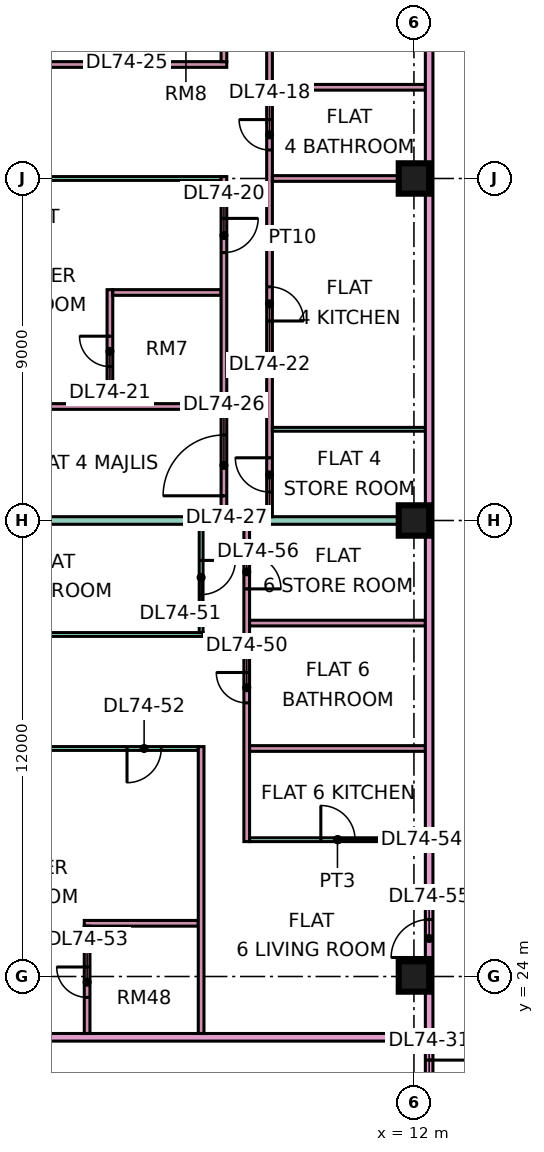
"""IFC4 building model, lengths in metres.
Left out: names, types, materials, properties, quantities, classifications, styles, units other than length and angle.
Written with IfcOpenShell. Run it as: python <this file> out.ifc"""

import sys

from ifc_helpers import new_model, si_unit, direction, frame, frame_2d, origin, origin_2d, place, context, subcontext, project, spatial, rectangle, extrude, element, fill, save


model = new_model("IFC4")
c1 = context("Model", 3, precision=1e-05, world=origin(), true_north=direction((0.0, 1.0)))
c2 = subcontext(c1, "Body", "Model", "MODEL_VIEW")
j1 = project(units=[si_unit("LENGTHUNIT", "METRE"), si_unit("PLANEANGLEUNIT", "RADIAN")], contexts=[c1])
p1 = place(None, origin())
s1 = spatial("IfcSite", under=j1, at=p1, CompositionType="ELEMENT")
p2 = place(p1, origin())
s2 = spatial("IfcBuilding", under=s1, at=p2, CompositionType="ELEMENT")
p3 = place(p2, frame((0.0, 0.0, 314.65)))
s3 = spatial("IfcBuildingStorey", under=s2, at=p3, CompositionType="ELEMENT", Elevation=314.65)
for number, where, z_axis, x_axis in (
    (1, (12.0, 24.0, 0.0), (0.0, 0.0, 1.0), (1.0, 0.0, 0.0)),
    (2, (12.0, 36.0, 0.0), (0.0, 0.0, 1.0), (1.0, 0.0, 0.0)),
    (3, (12.0, 45.0, 0.0), (0.0, 0.0, 1.0), (1.0, 0.0, 0.0)),
):
    element("IfcColumn", number, at=place(p3, frame(where, z_axis=z_axis, x_axis=x_axis)), inside=s3, PredefinedType="COLUMN", context=c2, shape_type="SweptSolid", body=[
        extrude(rectangle(XDim=0.8, YDim=0.8, at=origin_2d()), origin(), (0.0, 0.0, 1.0), 3.75),
    ])
p4 = place(p3, frame((-1.35, 30.0, 0.0), z_axis=(0.0, 0.0, 1.0), x_axis=(1.0, 0.0, 0.0)))
e4 = element("IfcWall", 4, at=p4, inside=s3, PredefinedType="PARTITIONING", context=c2, shape_type="SweptSolid", body=[
    extrude(rectangle(XDim=7.675, YDim=0.1, at=frame_2d((3.837, 0.0))), origin(), (0.0, 0.0, 1.0), 3.35),
])
p5 = place(p4, frame((5.8, 0.0, 0.0)))
e5 = element("IfcOpeningElement", 5, at=p5, cuts=e4, PredefinedType="OPENING", context=c2, shape_type="SweptSolid", body=[
    extrude(rectangle(XDim=0.9, YDim=2.1, at=frame_2d((0.45, 1.05))), frame((0.0, 0.06, 0.0), z_axis=(0.0, -1.0, 0.0), x_axis=(1.0, 0.0, 0.0)), (0.0, 0.0, 1.0), 0.12),
])
p6 = place(p3, frame((-1.35, 33.0, 0.0), z_axis=(0.0, 0.0, 1.0), x_axis=(1.0, 0.0, 0.0)))
e6 = element("IfcWall", 6, at=p6, inside=s3, PredefinedType="PARTITIONING", context=c2, shape_type="SweptSolid", body=[
    extrude(rectangle(XDim=7.8, YDim=0.1, at=frame_2d((3.9, 0.0))), origin(), (0.0, 0.0, 1.0), 3.35),
])
p7 = place(p3, frame((0.0, 36.0, 0.0), z_axis=(0.0, 0.0, 1.0), x_axis=(1.0, 0.0, 0.0)))
e7 = element("IfcWall", 7, at=p7, inside=s3, PredefinedType="PARTITIONING", context=c2, shape_type="SweptSolid", body=[
    extrude(rectangle(XDim=12.3, YDim=0.2, at=frame_2d((6.15, 0.0))), origin(), (0.0, 0.0, 1.0), 3.35),
])
p8 = place(p3, frame((0.0, 48.0, 0.0), z_axis=(0.0, 0.0, 1.0), x_axis=(1.0, 0.0, 0.0)))
e8 = element("IfcWall", 8, at=p8, inside=s3, PredefinedType="PARTITIONING", context=c2, shape_type="SweptSolid", body=[
    extrude(rectangle(XDim=7.075, YDim=0.15, at=frame_2d((3.538, 0.0))), origin(), (0.0, 0.0, 1.0), 3.35),
])
p9 = place(p3, frame((0.074, 22.4, 0.0), z_axis=(0.0, 0.0, 1.0), x_axis=(1.0, 0.0, 0.0)))
e9 = element("IfcWall", 9, at=p9, inside=s3, PredefinedType="PARTITIONING", context=c2, shape_type="SweptSolid", body=[
    extrude(rectangle(XDim=12.226, YDim=0.2, at=frame_2d((6.113, 0.0))), origin(), (0.0, 0.0, 1.0), 3.35),
])
p10 = place(p3, frame((0.074, 39.0, 0.0), z_axis=(0.0, 0.0, 1.0), x_axis=(1.0, 0.0, 0.0)))
e10 = element("IfcWall", 10, at=p10, inside=s3, PredefinedType="PARTITIONING", context=c2, shape_type="SweptSolid", body=[
    extrude(rectangle(XDim=6.851, YDim=0.15, at=frame_2d((3.426, 0.0))), origin(), (0.0, 0.0, 1.0), 3.35),
])
p11 = place(p3, frame((0.074, 45.0, 0.0), z_axis=(0.0, 0.0, 1.0), x_axis=(1.0, 0.0, 0.0)))
e11 = element("IfcWall", 11, at=p11, inside=s3, PredefinedType="PARTITIONING", context=c2, shape_type="SweptSolid", body=[
    extrude(rectangle(XDim=6.851, YDim=0.1, at=frame_2d((3.426, 0.0))), origin(), (0.0, 0.0, 1.0), 3.35),
])
p12 = place(p3, frame((3.325, 25.4, 0.0), z_axis=(0.0, 0.0, 1.0), x_axis=(1.0, 0.0, 0.0)))
e12 = element("IfcWall", 12, at=p12, inside=s3, PredefinedType="PARTITIONING", context=c2, shape_type="SweptSolid", body=[
    extrude(rectangle(XDim=3.0, YDim=0.15, at=frame_2d((1.5, 0.0))), origin(), (0.0, 0.0, 1.0), 3.35),
])
p13 = place(p3, frame((3.4, 22.5, 0.0), z_axis=(0.0, 0.0, 1.0), x_axis=(0.0, 1.0, 0.0)))
e13 = element("IfcWall", 13, at=p13, inside=s3, PredefinedType="PARTITIONING", context=c2, shape_type="SweptSolid", body=[
    extrude(rectangle(XDim=2.825, YDim=0.15, at=frame_2d((1.413, 0.0))), origin(), (0.0, 0.0, 1.0), 3.35),
])
p14 = place(p13, frame((0.95, 0.0, 0.0)))
e14 = element("IfcOpeningElement", 14, at=p14, cuts=e13, PredefinedType="OPENING", context=c2, shape_type="SweptSolid", body=[
    extrude(rectangle(XDim=0.8, YDim=2.1, at=frame_2d((0.4, 1.05))), frame((0.0, 0.085, 0.0), z_axis=(0.0, -1.0, 0.0), x_axis=(1.0, 0.0, 0.0)), (0.0, 0.0, 1.0), 0.17),
])
p15 = place(p3, frame((4.0, 39.075, 0.0), z_axis=(0.0, 0.0, 1.0), x_axis=(0.0, 1.0, 0.0)))
e15 = element("IfcWall", 15, at=p15, inside=s3, PredefinedType="PARTITIONING", context=c2, shape_type="SweptSolid", body=[
    extrude(rectangle(XDim=3.0, YDim=0.15, at=frame_2d((1.5, 0.0))), origin(), (0.0, 0.0, 1.0), 3.35),
])
p16 = place(p15, frame((0.975, 0.0, 0.0)))
e16 = element("IfcOpeningElement", 16, at=p16, cuts=e15, PredefinedType="OPENING", context=c2, shape_type="SweptSolid", body=[
    extrude(rectangle(XDim=0.8, YDim=2.1, at=frame_2d((0.4, 1.05))), frame((0.0, 0.085, 0.0), z_axis=(0.0, -1.0, 0.0), x_axis=(1.0, 0.0, 0.0)), (0.0, 0.0, 1.0), 0.17),
])
p17 = place(p3, frame((4.075, 42.0, 0.0), z_axis=(0.0, 0.0, 1.0), x_axis=(1.0, 0.0, 0.0)))
e17 = element("IfcWall", 17, at=p17, inside=s3, PredefinedType="PARTITIONING", context=c2, shape_type="SweptSolid", body=[
    extrude(rectangle(XDim=2.85, YDim=0.15, at=frame_2d((1.425, 0.0))), origin(), (0.0, 0.0, 1.0), 3.35),
])
p18 = place(p3, frame((5.0, 48.075, 0.0), z_axis=(0.0, 0.0, 1.0), x_axis=(0.0, 1.0, 0.0)))
e18 = element("IfcWall", 18, at=p18, inside=s3, PredefinedType="PARTITIONING", context=c2, shape_type="SweptSolid", body=[
    extrude(rectangle(XDim=1.45, YDim=0.15, at=frame_2d((0.725, 0.0))), origin(), (0.0, 0.0, 1.0), 3.35),
])
p19 = place(p3, frame((6.4, 22.5, 0.0), z_axis=(0.0, 0.0, 1.0), x_axis=(0.0, 1.0, 0.0)))
e19 = element("IfcWall", 19, at=p19, inside=s3, PredefinedType="PARTITIONING", context=c2, shape_type="SweptSolid", body=[
    extrude(rectangle(XDim=7.55, YDim=0.15, at=frame_2d((3.775, 0.0))), origin(), (0.0, 0.0, 1.0), 3.35),
])
p20 = place(p3, frame((6.4, 33.05, 0.0), z_axis=(0.0, 0.0, 1.0), x_axis=(0.0, 1.0, 0.0)))
e20 = element("IfcWall", 20, at=p20, inside=s3, PredefinedType="PARTITIONING", context=c2, shape_type="SweptSolid", body=[
    extrude(rectangle(XDim=2.85, YDim=0.1, at=frame_2d((1.425, 0.0))), origin(), (0.0, 0.0, 1.0), 3.35),
])
p21 = place(p20, frame((1.0, 0.0, 0.0)))
e21 = element("IfcOpeningElement", 21, at=p21, cuts=e20, PredefinedType="OPENING", context=c2, shape_type="SweptSolid", body=[
    extrude(rectangle(XDim=0.9, YDim=2.1, at=frame_2d((0.45, 1.05))), frame((0.0, 0.06, 0.0), z_axis=(0.0, -1.0, 0.0), x_axis=(1.0, 0.0, 0.0)), (0.0, 0.0, 1.0), 0.12),
])
p22 = place(p3, frame((7.0, 36.1, 0.0), z_axis=(0.0, 0.0, 1.0), x_axis=(0.0, 1.0, 0.0)))
e22 = element("IfcWall", 22, at=p22, inside=s3, PredefinedType="PARTITIONING", context=c2, shape_type="SweptSolid", body=[
    extrude(rectangle(XDim=8.95, YDim=0.15, at=frame_2d((4.475, 0.0))), origin(), (0.0, 0.0, 1.0), 3.35),
])
p23 = place(p22, frame((6.95, 0.0, 0.0)))
e23 = element("IfcOpeningElement", 23, at=p23, cuts=e22, PredefinedType="OPENING", context=c2, shape_type="SweptSolid", body=[
    extrude(rectangle(XDim=0.9, YDim=2.1, at=frame_2d((0.45, 1.05))), frame((0.0, 0.085, 0.0), z_axis=(0.0, -1.0, 0.0), x_axis=(1.0, 0.0, 0.0)), (0.0, 0.0, 1.0), 0.17),
])
p24 = place(p22, frame((0.55, 0.0, 0.0)))
e24 = element("IfcOpeningElement", 24, at=p24, cuts=e22, PredefinedType="OPENING", context=c2, shape_type="SweptSolid", body=[
    extrude(rectangle(XDim=1.6, YDim=2.1, at=frame_2d((0.8, 1.05))), frame((0.0, 0.085, 0.0), z_axis=(0.0, -1.0, 0.0), x_axis=(1.0, 0.0, 0.0)), (0.0, 0.0, 1.0), 0.17),
])
p25 = place(p3, frame((7.0, 48.075, 0.0), z_axis=(0.0, 0.0, 1.0), x_axis=(0.0, 1.0, 0.0)))
e25 = element("IfcWall", 25, at=p25, inside=s3, PredefinedType="PARTITIONING", context=c2, shape_type="SweptSolid", body=[
    extrude(rectangle(XDim=7.275, YDim=0.15, at=frame_2d((3.638, 0.0))), origin(), (0.0, 0.0, 1.0), 3.35),
])
p26 = place(p25, frame((3.975, 0.0, 0.0)))
e26 = element("IfcOpeningElement", 26, at=p26, cuts=e25, PredefinedType="OPENING", context=c2, shape_type="SweptSolid", body=[
    extrude(rectangle(XDim=0.9, YDim=2.1, at=frame_2d((0.45, 1.05))), frame((0.0, 0.085, 0.0), z_axis=(0.0, -1.0, 0.0), x_axis=(1.0, 0.0, 0.0)), (0.0, 0.0, 1.0), 0.17),
])
p27 = place(p25, frame((1.825, 0.0, 0.0)))
e27 = element("IfcOpeningElement", 27, at=p27, cuts=e25, PredefinedType="OPENING", context=c2, shape_type="SweptSolid", body=[
    extrude(rectangle(XDim=0.8, YDim=2.1, at=frame_2d((0.4, 1.05))), frame((0.0, 0.085, 0.0), z_axis=(0.0, -1.0, 0.0), x_axis=(1.0, 0.0, 0.0)), (0.0, 0.0, 1.0), 0.17),
])
p28 = place(p3, frame((7.6, 27.55, 0.0), z_axis=(0.0, 0.0, 1.0), x_axis=(0.0, 1.0, 0.0)))
e28 = element("IfcWall", 28, at=p28, inside=s3, PredefinedType="PARTITIONING", context=c2, shape_type="SweptSolid", body=[
    extrude(rectangle(XDim=8.35, YDim=0.15, at=frame_2d((4.175, 0.0))), origin(), (0.0, 0.0, 1.0), 3.35),
])
p29 = place(p28, frame((3.65, 0.0, 0.0)))
e29 = element("IfcOpeningElement", 29, at=p29, cuts=e28, PredefinedType="OPENING", context=c2, shape_type="SweptSolid", body=[
    extrude(rectangle(XDim=0.8, YDim=2.1, at=frame_2d((0.4, 1.05))), frame((0.0, 0.085, 0.0), z_axis=(0.0, -1.0, 0.0), x_axis=(1.0, 0.0, 0.0)), (0.0, 0.0, 1.0), 0.17),
])
p30 = place(p28, frame((6.65, 0.0, 0.0)))
e30 = element("IfcOpeningElement", 30, at=p30, cuts=e28, PredefinedType="OPENING", context=c2, shape_type="SweptSolid", body=[
    extrude(rectangle(XDim=0.9, YDim=2.1, at=frame_2d((0.45, 1.05))), frame((0.0, 0.085, 0.0), z_axis=(0.0, -1.0, 0.0), x_axis=(1.0, 0.0, 0.0)), (0.0, 0.0, 1.0), 0.17),
])
p31 = place(p3, frame((7.675, 27.6, 0.0), z_axis=(0.0, 0.0, 1.0), x_axis=(1.0, 0.0, 0.0)))
e31 = element("IfcWall", 31, at=p31, inside=s3, PredefinedType="PARTITIONING", context=c2, shape_type="SweptSolid", body=[
    extrude(rectangle(XDim=4.625, YDim=0.1, at=frame_2d((2.312, 0.0))), origin(), (0.0, 0.0, 1.0), 3.35),
])
p32 = place(p31, frame((1.875, 0.0, 0.0)))
e32 = element("IfcOpeningElement", 32, at=p32, cuts=e31, PredefinedType="OPENING", context=c2, shape_type="SweptSolid", body=[
    extrude(rectangle(XDim=0.9, YDim=2.1, at=frame_2d((0.45, 1.05))), frame((0.0, 0.06, 0.0), z_axis=(0.0, -1.0, 0.0), x_axis=(1.0, 0.0, 0.0)), (0.0, 0.0, 1.0), 0.12),
])
for number, where, z_axis, x_axis in (
    (33, (7.675, 30.0, 0.0), (0.0, 0.0, 1.0), (1.0, 0.0, 0.0)),
    (34, (7.675, 33.3, 0.0), (0.0, 0.0, 1.0), (1.0, 0.0, 0.0)),
):
    element("IfcWall", number, at=place(p3, frame(where, z_axis=z_axis, x_axis=x_axis)), inside=s3, PredefinedType="PARTITIONING", context=c2, shape_type="SweptSolid", body=[
        extrude(rectangle(XDim=4.625, YDim=0.15, at=frame_2d((2.312, 0.0))), origin(), (0.0, 0.0, 1.0), 3.35),
    ])
p33 = place(p3, frame((8.2, 36.1, 0.0), z_axis=(0.0, 0.0, 1.0), x_axis=(0.0, 1.0, 0.0)))
e35 = element("IfcWall", 35, at=p33, inside=s3, PredefinedType="PARTITIONING", context=c2, shape_type="SweptSolid", body=[
    extrude(rectangle(XDim=14.65, YDim=0.15, at=frame_2d((7.325, 0.0))), origin(), (0.0, 0.0, 1.0), 3.35),
])
p34 = place(p33, frame((9.65, 0.0, 0.0)))
e36 = element("IfcOpeningElement", 36, at=p34, cuts=e35, PredefinedType="OPENING", context=c2, shape_type="SweptSolid", body=[
    extrude(rectangle(XDim=0.8, YDim=2.1, at=frame_2d((0.4, 1.05))), frame((0.0, 0.085, 0.0), z_axis=(0.0, -1.0, 0.0), x_axis=(1.0, 0.0, 0.0)), (0.0, 0.0, 1.0), 0.17),
])
p35 = place(p33, frame((5.15, 0.0, 0.0)))
e37 = element("IfcOpeningElement", 37, at=p35, cuts=e35, PredefinedType="OPENING", context=c2, shape_type="SweptSolid", body=[
    extrude(rectangle(XDim=0.9, YDim=2.1, at=frame_2d((0.45, 1.05))), frame((0.0, 0.085, 0.0), z_axis=(0.0, -1.0, 0.0), x_axis=(1.0, 0.0, 0.0)), (0.0, 0.0, 1.0), 0.17),
])
p36 = place(p33, frame((0.65, 0.0, 0.0)))
e38 = element("IfcOpeningElement", 38, at=p36, cuts=e35, PredefinedType="OPENING", context=c2, shape_type="SweptSolid", body=[
    extrude(rectangle(XDim=0.9, YDim=2.1, at=frame_2d((0.45, 1.05))), frame((0.0, 0.085, 0.0), z_axis=(0.0, -1.0, 0.0), x_axis=(1.0, 0.0, 0.0)), (0.0, 0.0, 1.0), 0.17),
])
p37 = place(p3, frame((8.275, 38.4, 0.0), z_axis=(0.0, 0.0, 1.0), x_axis=(1.0, 0.0, 0.0)))
e39 = element("IfcWall", 39, at=p37, inside=s3, PredefinedType="PARTITIONING", context=c2, shape_type="SweptSolid", body=[
    extrude(rectangle(XDim=4.025, YDim=0.1, at=frame_2d((2.013, 0.0))), origin(), (0.0, 0.0, 1.0), 3.35),
])
for number, where, z_axis, x_axis in (
    (40, (8.275, 45.0, 0.0), (0.0, 0.0, 1.0), (1.0, 0.0, 0.0)),
    (41, (8.275, 47.4, 0.0), (0.0, 0.0, 1.0), (1.0, 0.0, 0.0)),
):
    element("IfcWall", number, at=place(p3, frame(where, z_axis=z_axis, x_axis=x_axis)), inside=s3, PredefinedType="PARTITIONING", context=c2, shape_type="SweptSolid", body=[
        extrude(rectangle(XDim=4.025, YDim=0.15, at=frame_2d((2.013, 0.0))), origin(), (0.0, 0.0, 1.0), 3.35),
    ])
p38 = place(p3, frame((12.4, 20.0, 0.0), z_axis=(0.0, 0.0, 1.0), x_axis=(0.0, 1.0, 0.0)))
e42 = element("IfcWall", 42, at=p38, inside=s3, PredefinedType="PARTITIONING", context=c2, shape_type="SweptSolid", body=[
    extrude(rectangle(XDim=33.926, YDim=0.2, at=frame_2d((16.963, 0.0))), origin(), (0.0, 0.0, 1.0), 3.35),
])
p39 = place(p38, frame((31.8, 0.0, 0.0)))
e43 = element("IfcOpeningElement", 43, at=p39, cuts=e42, PredefinedType="OPENING", context=c2, shape_type="SweptSolid", body=[
    extrude(rectangle(XDim=1.0, YDim=2.1, at=frame_2d((0.5, 1.05))), frame((0.0, 0.11, 0.0), z_axis=(0.0, -1.0, 0.0), x_axis=(1.0, 0.0, 0.0)), (0.0, 0.0, 1.0), 0.22),
])
p40 = place(p38, frame((0.6, 0.0, 0.0)))
e44 = element("IfcOpeningElement", 44, at=p40, cuts=e42, PredefinedType="OPENING", context=c2, shape_type="SweptSolid", body=[
    extrude(rectangle(XDim=1.2, YDim=2.1, at=frame_2d((0.6, 1.05))), frame((0.0, 0.11, 0.0), z_axis=(0.0, -1.0, 0.0), x_axis=(1.0, 0.0, 0.0)), (0.0, 0.0, 1.0), 0.22),
])
p41 = place(p38, frame((4.5, 0.0, 0.0)))
e45 = element("IfcOpeningElement", 45, at=p41, cuts=e42, PredefinedType="OPENING", context=c2, shape_type="SweptSolid", body=[
    extrude(rectangle(XDim=1.0, YDim=2.1, at=frame_2d((0.5, 1.05))), frame((0.0, 0.11, 0.0), z_axis=(0.0, -1.0, 0.0), x_axis=(1.0, 0.0, 0.0)), (0.0, 0.0, 1.0), 0.22),
])
p42 = place(p34, frame((0.8, 0.0, 0.0), z_axis=(0.0, 0.0, 1.0), x_axis=(-1.0, 0.0, 0.0)))
e46 = element("IfcDoor", 46, at=p42, inside=s3, OperationType="SINGLE_SWING_RIGHT", PredefinedType="DOOR", context=c2, shape_type="SweptSolid", body=[
    extrude(rectangle(XDim=0.8, YDim=2.1, at=frame_2d((0.4, 1.05))), frame((0.0, 0.025, 0.0), z_axis=(0.0, -1.0, 0.0), x_axis=(1.0, 0.0, 0.0)), (0.0, 0.0, 1.0), 0.05),
])
fill(e36, e46)
p43 = place(p23, origin())
e47 = element("IfcDoor", 47, at=p43, inside=s3, OperationType="SINGLE_SWING_RIGHT", PredefinedType="DOOR", context=c2, shape_type="SweptSolid", body=[
    extrude(rectangle(XDim=0.9, YDim=2.1, at=frame_2d((0.45, 1.05))), frame((0.0, 0.025, 0.0), z_axis=(0.0, -1.0, 0.0), x_axis=(1.0, 0.0, 0.0)), (0.0, 0.0, 1.0), 0.05),
])
fill(e23, e47)
p44 = place(p16, frame((0.8, 0.0, 0.0), z_axis=(0.0, 0.0, 1.0), x_axis=(-1.0, 0.0, 0.0)))
e48 = element("IfcDoor", 48, at=p44, inside=s3, OperationType="SINGLE_SWING_RIGHT", PredefinedType="DOOR", context=c2, shape_type="SweptSolid", body=[
    extrude(rectangle(XDim=0.8, YDim=2.1, at=frame_2d((0.4, 1.05))), frame((0.0, 0.025, 0.0), z_axis=(0.0, -1.0, 0.0), x_axis=(1.0, 0.0, 0.0)), (0.0, 0.0, 1.0), 0.05),
])
fill(e16, e48)
p45 = place(p35, frame((0.9, 0.0, 0.0), z_axis=(0.0, 0.0, 1.0), x_axis=(-1.0, 0.0, 0.0)))
e49 = element("IfcDoor", 49, at=p45, inside=s3, OperationType="SINGLE_SWING_LEFT", PredefinedType="DOOR", context=c2, shape_type="SweptSolid", body=[
    extrude(rectangle(XDim=0.9, YDim=2.1, at=frame_2d((0.45, 1.05))), frame((0.0, 0.025, 0.0), z_axis=(0.0, -1.0, 0.0), x_axis=(1.0, 0.0, 0.0)), (0.0, 0.0, 1.0), 0.05),
])
fill(e37, e49)
p46 = place(p24, origin())
e50 = element("IfcDoor", 50, at=p46, inside=s3, OperationType="DOUBLE_DOOR_SINGLE_SWING", PredefinedType="DOOR", context=c2, shape_type="SweptSolid", body=[
    extrude(rectangle(XDim=1.6, YDim=2.1, at=frame_2d((0.8, 1.05))), frame((0.0, 0.025, 0.0), z_axis=(0.0, -1.0, 0.0), x_axis=(1.0, 0.0, 0.0)), (0.0, 0.0, 1.0), 0.05),
])
fill(e24, e50)
p47 = place(p36, frame((0.9, 0.0, 0.0), z_axis=(0.0, 0.0, 1.0), x_axis=(-1.0, 0.0, 0.0)))
e51 = element("IfcDoor", 51, at=p47, inside=s3, OperationType="SINGLE_SWING_RIGHT", PredefinedType="DOOR", context=c2, shape_type="SweptSolid", body=[
    extrude(rectangle(XDim=0.9, YDim=2.1, at=frame_2d((0.45, 1.05))), frame((0.0, 0.025, 0.0), z_axis=(0.0, -1.0, 0.0), x_axis=(1.0, 0.0, 0.0)), (0.0, 0.0, 1.0), 0.05),
])
fill(e38, e51)
p48 = place(p40, origin())
e52 = element("IfcDoor", 52, at=p48, inside=s3, OperationType="SINGLE_SWING_RIGHT", PredefinedType="DOOR", context=c2, shape_type="SweptSolid", body=[
    extrude(rectangle(XDim=1.2, YDim=2.1, at=frame_2d((0.6, 1.05))), frame((0.0, 0.025, 0.0), z_axis=(0.0, -1.0, 0.0), x_axis=(1.0, 0.0, 0.0)), (0.0, 0.0, 1.0), 0.05),
])
fill(e44, e52)
p49 = place(p29, frame((0.8, 0.0, 0.0), z_axis=(0.0, 0.0, 1.0), x_axis=(-1.0, 0.0, 0.0)))
e53 = element("IfcDoor", 53, at=p49, inside=s3, OperationType="SINGLE_SWING_RIGHT", PredefinedType="DOOR", context=c2, shape_type="SweptSolid", body=[
    extrude(rectangle(XDim=0.8, YDim=2.1, at=frame_2d((0.4, 1.05))), frame((0.0, 0.025, 0.0), z_axis=(0.0, -1.0, 0.0), x_axis=(1.0, 0.0, 0.0)), (0.0, 0.0, 1.0), 0.05),
])
fill(e29, e53)
p50 = place(p21, origin())
e54 = element("IfcDoor", 54, at=p50, inside=s3, OperationType="SINGLE_SWING_RIGHT", PredefinedType="DOOR", context=c2, shape_type="SweptSolid", body=[
    extrude(rectangle(XDim=0.9, YDim=2.1, at=frame_2d((0.45, 1.05))), frame((0.0, 0.025, 0.0), z_axis=(0.0, -1.0, 0.0), x_axis=(1.0, 0.0, 0.0)), (0.0, 0.0, 1.0), 0.05),
])
fill(e21, e54)
p51 = place(p5, frame((0.9, 0.0, 0.0), z_axis=(0.0, 0.0, 1.0), x_axis=(-1.0, 0.0, 0.0)))
e55 = element("IfcDoor", 55, at=p51, inside=s3, OperationType="SINGLE_SWING_LEFT", PredefinedType="DOOR", context=c2, shape_type="SweptSolid", body=[
    extrude(rectangle(XDim=0.9, YDim=2.1, at=frame_2d((0.45, 1.05))), frame((0.0, 0.025, 0.0), z_axis=(0.0, -1.0, 0.0), x_axis=(1.0, 0.0, 0.0)), (0.0, 0.0, 1.0), 0.05),
])
fill(e5, e55)
p52 = place(p14, frame((0.8, 0.0, 0.0), z_axis=(0.0, 0.0, 1.0), x_axis=(-1.0, 0.0, 0.0)))
e56 = element("IfcDoor", 56, at=p52, inside=s3, OperationType="SINGLE_SWING_RIGHT", PredefinedType="DOOR", context=c2, shape_type="SweptSolid", body=[
    extrude(rectangle(XDim=0.8, YDim=2.1, at=frame_2d((0.4, 1.05))), frame((0.0, 0.025, 0.0), z_axis=(0.0, -1.0, 0.0), x_axis=(1.0, 0.0, 0.0)), (0.0, 0.0, 1.0), 0.05),
])
fill(e14, e56)
p53 = place(p32, origin())
e57 = element("IfcDoor", 57, at=p53, inside=s3, OperationType="SINGLE_SWING_LEFT", PredefinedType="DOOR", context=c2, shape_type="SweptSolid", body=[
    extrude(rectangle(XDim=0.9, YDim=2.1, at=frame_2d((0.45, 1.05))), frame((0.0, 0.025, 0.0), z_axis=(0.0, -1.0, 0.0), x_axis=(1.0, 0.0, 0.0)), (0.0, 0.0, 1.0), 0.05),
])
fill(e32, e57)
p54 = place(p41, origin())
e58 = element("IfcDoor", 58, at=p54, inside=s3, OperationType="SINGLE_SWING_LEFT", PredefinedType="DOOR", context=c2, shape_type="SweptSolid", body=[
    extrude(rectangle(XDim=1.0, YDim=2.1, at=frame_2d((0.5, 1.05))), frame((0.0, 0.025, 0.0), z_axis=(0.0, -1.0, 0.0), x_axis=(1.0, 0.0, 0.0)), (0.0, 0.0, 1.0), 0.05),
])
fill(e45, e58)
p55 = place(p30, frame((0.9, 0.0, 0.0), z_axis=(0.0, 0.0, 1.0), x_axis=(-1.0, 0.0, 0.0)))
e59 = element("IfcDoor", 59, at=p55, inside=s3, OperationType="SINGLE_SWING_LEFT", PredefinedType="DOOR", context=c2, shape_type="SweptSolid", body=[
    extrude(rectangle(XDim=0.9, YDim=2.1, at=frame_2d((0.45, 1.05))), frame((0.0, 0.025, 0.0), z_axis=(0.0, -1.0, 0.0), x_axis=(1.0, 0.0, 0.0)), (0.0, 0.0, 1.0), 0.05),
])
fill(e30, e59)
save(model, sys.argv[1])
